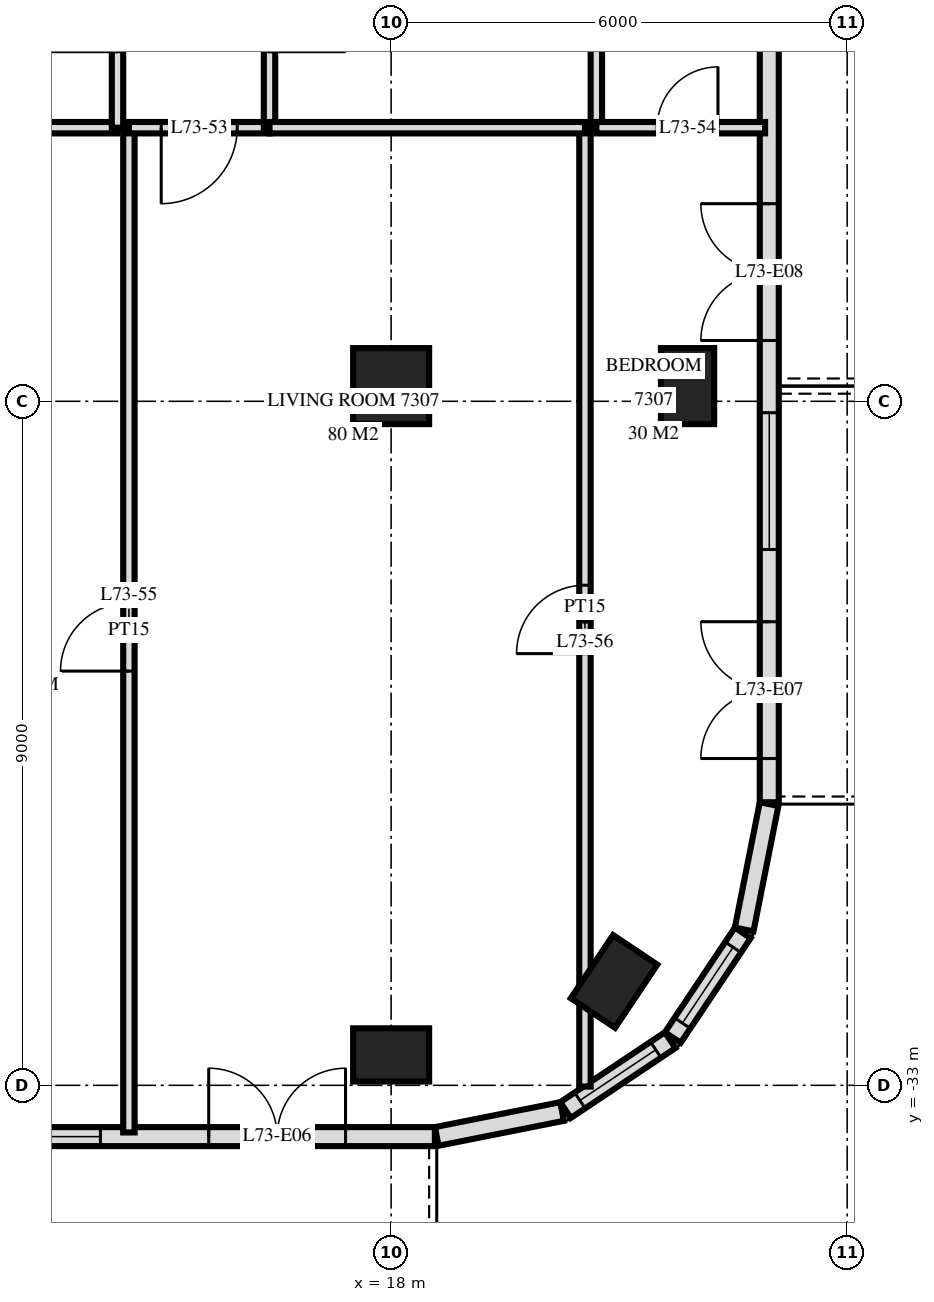
"""IFC4 building model, lengths in metres.
Left out: names, types, materials, properties, quantities, classifications, styles, units other than length and angle.
Written with IfcOpenShell. Run it as: python <this file> out.ifc"""

import sys

from ifc_helpers import new_model, si_unit, direction, frame, frame_2d, origin, origin_2d, place, context, subcontext, project, spatial, rectangle, extrude, element, fill, save


model = new_model("IFC4")
c1 = context("Model", 3, precision=1e-05, world=origin(), true_north=direction((0.0, 1.0)))
c2 = subcontext(c1, "Body", "Model", "MODEL_VIEW")
j1 = project(units=[si_unit("LENGTHUNIT", "METRE"), si_unit("PLANEANGLEUNIT", "RADIAN")], contexts=[c1])
p1 = place(None, origin())
s1 = spatial("IfcSite", under=j1, at=p1, CompositionType="ELEMENT")
p2 = place(p1, origin())
s2 = spatial("IfcBuilding", under=s1, at=p2, CompositionType="ELEMENT")
p3 = place(p2, frame((0.0, 0.0, 277.1)))
s3 = spatial("IfcBuildingStorey", under=s2, at=p3, CompositionType="ELEMENT", Elevation=277.1)
p4 = place(p3, frame((18.0, -32.6, 0.0), z_axis=(0.0, 0.0, 1.0), x_axis=(1.0, 0.0, 0.0)))
e1 = element("IfcColumn", 1, at=p4, inside=s3, PredefinedType="COLUMN", context=c2, shape_type="SweptSolid", body=[
    extrude(rectangle(XDim=1.0, YDim=0.7, at=origin_2d()), origin(), (0.0, 0.0, 1.0), 3.5),
])
p5 = place(p3, frame((18.0, -23.8, 0.0), z_axis=(0.0, 0.0, 1.0), x_axis=(1.0, 0.0, 0.0)))
e2 = element("IfcColumn", 2, at=p5, inside=s3, PredefinedType="COLUMN", context=c2, shape_type="SweptSolid", body=[
    extrude(rectangle(XDim=1.0, YDim=1.0, at=origin_2d()), origin(), (0.0, 0.0, 1.0), 3.5),
])
for number, where, z_axis, x_axis in (
    (3, (20.933, -31.633, 0.0), (0.0, 0.0, 1.0), (0.556, 0.831, 0.0)),
    (4, (21.9, -23.8, 0.0), (0.0, 0.0, 1.0), (0.0, 1.0, 0.0)),
):
    element("IfcColumn", number, at=place(p3, frame(where, z_axis=z_axis, x_axis=x_axis)), inside=s3, PredefinedType="COLUMN", context=c2, shape_type="SweptSolid", body=[
        extrude(rectangle(XDim=1.0, YDim=0.7, at=origin_2d()), origin(), (0.0, 0.0, 1.0), 3.5),
    ])
p6 = place(p3, frame((-18.575, -33.675, 0.0), z_axis=(0.0, 0.0, 1.0), x_axis=(1.0, 0.0, 0.0)))
e5 = element("IfcWall", 5, at=p6, inside=s3, PredefinedType="SOLIDWALL", context=c2, shape_type="SweptSolid", body=[
    extrude(rectangle(XDim=37.151, YDim=0.25, at=frame_2d((18.575, 0.0))), origin(), (0.0, 0.0, 1.0), 3.22),
])
p7 = place(p6, frame((4.175, 0.0, 0.0)))
e6 = element("IfcOpeningElement", 6, at=p7, cuts=e5, PredefinedType="OPENING", context=c2, shape_type="SweptSolid", body=[
    extrude(rectangle(XDim=1.8, YDim=2.4, at=frame_2d((0.9, 1.2))), frame((0.0, 0.135, 0.0), z_axis=(0.0, -1.0, 0.0), x_axis=(1.0, 0.0, 0.0)), (0.0, 0.0, 1.0), 0.27),
])
p8 = place(p6, frame((7.512, 0.0, 0.0)))
e7 = element("IfcOpeningElement", 7, at=p8, cuts=e5, PredefinedType="OPENING", context=c2, shape_type="SweptSolid", body=[
    extrude(rectangle(XDim=1.8, YDim=2.4, at=frame_2d((0.9, 1.2))), frame((0.0, 0.135, 0.0), z_axis=(0.0, -1.0, 0.0), x_axis=(1.0, 0.0, 0.0)), (0.0, 0.0, 1.0), 0.27),
])
p9 = place(p6, frame((10.287, 0.0, 0.9)))
e8 = element("IfcOpeningElement", 8, at=p9, cuts=e5, PredefinedType="OPENING", context=c2, shape_type="SweptSolid", body=[
    extrude(rectangle(XDim=1.8, YDim=1.5, at=frame_2d((0.9, 0.75))), frame((0.0, 0.135, 0.0), z_axis=(0.0, -1.0, 0.0), x_axis=(1.0, 0.0, 0.0)), (0.0, 0.0, 1.0), 0.27),
])
p10 = place(p6, frame((12.875, 0.0, 0.9)))
e9 = element("IfcOpeningElement", 9, at=p10, cuts=e5, PredefinedType="OPENING", context=c2, shape_type="SweptSolid", body=[
    extrude(rectangle(XDim=2.4, YDim=1.5, at=frame_2d((1.2, 0.75))), frame((0.0, 0.135, 0.0), z_axis=(0.0, -1.0, 0.0), x_axis=(1.0, 0.0, 0.0)), (0.0, 0.0, 1.0), 0.27),
])
p11 = place(p6, frame((16.175, 0.0, 0.0)))
e10 = element("IfcOpeningElement", 10, at=p11, cuts=e5, PredefinedType="OPENING", context=c2, shape_type="SweptSolid", body=[
    extrude(rectangle(XDim=1.8, YDim=2.4, at=frame_2d((0.9, 1.2))), frame((0.0, 0.135, 0.0), z_axis=(0.0, -1.0, 0.0), x_axis=(1.0, 0.0, 0.0)), (0.0, 0.0, 1.0), 0.27),
])
p12 = place(p6, frame((19.175, 0.0, 0.0)))
e11 = element("IfcOpeningElement", 11, at=p12, cuts=e5, PredefinedType="OPENING", context=c2, shape_type="SweptSolid", body=[
    extrude(rectangle(XDim=1.8, YDim=2.4, at=frame_2d((0.9, 1.2))), frame((0.0, 0.135, 0.0), z_axis=(0.0, -1.0, 0.0), x_axis=(1.0, 0.0, 0.0)), (0.0, 0.0, 1.0), 0.27),
])
p13 = place(p6, frame((21.875, 0.0, 0.9)))
e12 = element("IfcOpeningElement", 12, at=p13, cuts=e5, PredefinedType="OPENING", context=c2, shape_type="SweptSolid", body=[
    extrude(rectangle(XDim=2.4, YDim=1.5, at=frame_2d((1.2, 0.75))), frame((0.0, 0.135, 0.0), z_axis=(0.0, -1.0, 0.0), x_axis=(1.0, 0.0, 0.0)), (0.0, 0.0, 1.0), 0.27),
])
p14 = place(p6, frame((25.175, 0.0, 0.0)))
e13 = element("IfcOpeningElement", 13, at=p14, cuts=e5, PredefinedType="OPENING", context=c2, shape_type="SweptSolid", body=[
    extrude(rectangle(XDim=1.8, YDim=2.4, at=frame_2d((0.9, 1.2))), frame((0.0, 0.135, 0.0), z_axis=(0.0, -1.0, 0.0), x_axis=(1.0, 0.0, 0.0)), (0.0, 0.0, 1.0), 0.27),
])
p15 = place(p6, frame((27.875, 0.0, 0.9)))
e14 = element("IfcOpeningElement", 14, at=p15, cuts=e5, PredefinedType="OPENING", context=c2, shape_type="SweptSolid", body=[
    extrude(rectangle(XDim=2.4, YDim=1.5, at=frame_2d((1.2, 0.75))), frame((0.0, 0.135, 0.0), z_axis=(0.0, -1.0, 0.0), x_axis=(1.0, 0.0, 0.0)), (0.0, 0.0, 1.0), 0.27),
])
p16 = place(p6, frame((30.95, 0.0, 0.9)))
e15 = element("IfcOpeningElement", 15, at=p16, cuts=e5, PredefinedType="OPENING", context=c2, shape_type="SweptSolid", body=[
    extrude(rectangle(XDim=1.8, YDim=1.5, at=frame_2d((0.9, 0.75))), frame((0.0, 0.135, 0.0), z_axis=(0.0, -1.0, 0.0), x_axis=(1.0, 0.0, 0.0)), (0.0, 0.0, 1.0), 0.27),
])
p17 = place(p6, frame((34.175, 0.0, 0.0)))
e16 = element("IfcOpeningElement", 16, at=p17, cuts=e5, PredefinedType="OPENING", context=c2, shape_type="SweptSolid", body=[
    extrude(rectangle(XDim=1.8, YDim=2.4, at=frame_2d((0.9, 1.2))), frame((0.0, 0.135, 0.0), z_axis=(0.0, -1.0, 0.0), x_axis=(1.0, 0.0, 0.0)), (0.0, 0.0, 1.0), 0.27),
])
p18 = place(p3, frame((18.6, -33.673, 0.0), z_axis=(0.0, 0.0, 1.0), x_axis=(0.980770110232, 0.195166572128, 0.0)))
e17 = element("IfcWall", 17, at=p18, inside=s3, PredefinedType="SOLIDWALL", context=c2, shape_type="SweptSolid", body=[
    extrude(rectangle(XDim=1.681, YDim=0.25, at=frame_2d((0.841, 0.0))), origin(), (0.0, 0.0, 1.0), 3.22),
])
p19 = place(p3, frame((20.294, -33.326, 0.0), z_axis=(0.0, 0.0, 1.0), x_axis=(0.831482937015, 0.55555029066, 0.0)))
e18 = element("IfcWall", 18, at=p19, inside=s3, PredefinedType="SOLIDWALL", context=c2, shape_type="SweptSolid", body=[
    extrude(rectangle(XDim=1.656, YDim=0.25, at=frame_2d((0.828, 0.0))), origin(), (0.0, 0.0, 1.0), 3.22),
])
p20 = place(p19, frame((0.228, 0.0, 0.9)))
e19 = element("IfcOpeningElement", 19, at=p20, cuts=e18, PredefinedType="OPENING", context=c2, shape_type="SweptSolid", body=[
    extrude(rectangle(XDim=1.2, YDim=1.5, at=frame_2d((0.6, 0.75))), frame((0.0, 0.135, 0.0), z_axis=(0.0, -1.0, 0.0), x_axis=(1.0, 0.0, 0.0)), (0.0, 0.0, 1.0), 0.27),
])
p21 = place(p3, frame((21.706, -32.371, 0.0), z_axis=(0.0, 0.0, 1.0), x_axis=(0.55555029066, 0.831482937015, 0.0)))
e20 = element("IfcWall", 20, at=p21, inside=s3, PredefinedType="SOLIDWALL", context=c2, shape_type="SweptSolid", body=[
    extrude(rectangle(XDim=1.656, YDim=0.25, at=frame_2d((0.828, 0.0))), origin(), (0.0, 0.0, 1.0), 3.22),
])
p22 = place(p21, frame((0.228, 0.0, 0.9)))
e21 = element("IfcOpeningElement", 21, at=p22, cuts=e20, PredefinedType="OPENING", context=c2, shape_type="SweptSolid", body=[
    extrude(rectangle(XDim=1.2, YDim=1.5, at=frame_2d((0.6, 0.75))), frame((0.0, 0.135, 0.0), z_axis=(0.0, -1.0, 0.0), x_axis=(1.0, 0.0, 0.0)), (0.0, 0.0, 1.0), 0.27),
])
p23 = place(p3, frame((22.645, -30.949, 0.0), z_axis=(0.0, 0.0, 1.0), x_axis=(0.19513878023, 0.980775640221, 0.0)))
e22 = element("IfcWall", 22, at=p23, inside=s3, PredefinedType="SOLIDWALL", context=c2, shape_type="SweptSolid", body=[
    extrude(rectangle(XDim=1.681, YDim=0.25, at=frame_2d((0.841, 0.0))), origin(), (0.0, 0.0, 1.0), 3.22),
])
p24 = place(p3, frame((22.975, -29.275, 0.0), z_axis=(0.0, 0.0, 1.0), x_axis=(0.0, 1.0, 0.0)))
e23 = element("IfcWall", 23, at=p24, inside=s3, PredefinedType="SOLIDWALL", context=c2, shape_type="SweptSolid", body=[
    extrude(rectangle(XDim=25.951, YDim=0.25, at=frame_2d((12.975, 0.0))), origin(), (0.0, 0.0, 1.0), 3.22),
])
p25 = place(p24, frame((0.575, 0.0, 0.0)))
e24 = element("IfcOpeningElement", 24, at=p25, cuts=e23, PredefinedType="OPENING", context=c2, shape_type="SweptSolid", body=[
    extrude(rectangle(XDim=1.8, YDim=2.4, at=frame_2d((0.9, 1.2))), frame((0.0, 0.135, 0.0), z_axis=(0.0, -1.0, 0.0), x_axis=(1.0, 0.0, 0.0)), (0.0, 0.0, 1.0), 0.27),
])
p26 = place(p24, frame((3.325, 0.0, 0.9)))
e25 = element("IfcOpeningElement", 25, at=p26, cuts=e23, PredefinedType="OPENING", context=c2, shape_type="SweptSolid", body=[
    extrude(rectangle(XDim=1.8, YDim=1.5, at=frame_2d((0.9, 0.75))), frame((0.0, 0.135, 0.0), z_axis=(0.0, -1.0, 0.0), x_axis=(1.0, 0.0, 0.0)), (0.0, 0.0, 1.0), 0.27),
])
p27 = place(p24, frame((6.075, 0.0, 0.0)))
e26 = element("IfcOpeningElement", 26, at=p27, cuts=e23, PredefinedType="OPENING", context=c2, shape_type="SweptSolid", body=[
    extrude(rectangle(XDim=1.8, YDim=2.4, at=frame_2d((0.9, 1.2))), frame((0.0, 0.135, 0.0), z_axis=(0.0, -1.0, 0.0), x_axis=(1.0, 0.0, 0.0)), (0.0, 0.0, 1.0), 0.27),
])
p28 = place(p24, frame((12.475, 0.0, 0.9)))
e27 = element("IfcOpeningElement", 27, at=p28, cuts=e23, PredefinedType="OPENING", context=c2, shape_type="SweptSolid", body=[
    extrude(rectangle(XDim=1.2, YDim=1.5, at=frame_2d((0.6, 0.75))), frame((0.0, 0.135, 0.0), z_axis=(0.0, -1.0, 0.0), x_axis=(1.0, 0.0, 0.0)), (0.0, 0.0, 1.0), 0.27),
])
p29 = place(p24, frame((16.175, 0.0, 0.0)))
e28 = element("IfcOpeningElement", 28, at=p29, cuts=e23, PredefinedType="OPENING", context=c2, shape_type="SweptSolid", body=[
    extrude(rectangle(XDim=1.8, YDim=2.4, at=frame_2d((0.9, 1.2))), frame((0.0, 0.135, 0.0), z_axis=(0.0, -1.0, 0.0), x_axis=(1.0, 0.0, 0.0)), (0.0, 0.0, 1.0), 0.27),
])
p30 = place(p24, frame((20.925, 0.0, 0.0)))
e29 = element("IfcOpeningElement", 29, at=p30, cuts=e23, PredefinedType="OPENING", context=c2, shape_type="SweptSolid", body=[
    extrude(rectangle(XDim=1.8, YDim=2.4, at=frame_2d((0.9, 1.2))), frame((0.0, 0.135, 0.0), z_axis=(0.0, -1.0, 0.0), x_axis=(1.0, 0.0, 0.0)), (0.0, 0.0, 1.0), 0.27),
])
p31 = place(p3, frame((20.7, -20.4, 0.0), z_axis=(0.0, 0.0, 1.0), x_axis=(0.0, 1.0, 0.0)))
e30 = element("IfcWall", 30, at=p31, inside=s3, PredefinedType="PARTITIONING", context=c2, shape_type="SweptSolid", body=[
    extrude(rectangle(XDim=3.0, YDim=0.15, at=frame_2d((1.5, 0.0))), origin(), (0.0, 0.0, 1.0), 3.22),
])
p32 = place(p3, frame((20.55, -33.017, 0.0), z_axis=(0.0, 0.0, 1.0), x_axis=(0.0, 1.0, 0.0)))
e31 = element("IfcWall", 31, at=p32, inside=s3, PredefinedType="PARTITIONING", context=c2, shape_type="SweptSolid", body=[
    extrude(rectangle(XDim=12.617, YDim=0.15, at=frame_2d((6.308, 0.0))), origin(), (0.0, 0.0, 1.0), 3.22),
])
p33 = place(p32, frame((5.697, 0.0, 0.0)))
e32 = element("IfcOpeningElement", 32, at=p33, cuts=e31, PredefinedType="OPENING", context=c2, shape_type="SweptSolid", body=[
    extrude(rectangle(XDim=0.9, YDim=2.1, at=frame_2d((0.45, 1.05))), frame((0.0, 0.085, 0.0), z_axis=(0.0, -1.0, 0.0), x_axis=(1.0, 0.0, 0.0)), (0.0, 0.0, 1.0), 0.17),
])
p34 = place(p3, frame((16.4, -20.4, 0.0), z_axis=(0.0, 0.0, 1.0), x_axis=(0.0, 1.0, 0.0)))
e33 = element("IfcWall", 33, at=p34, inside=s3, PredefinedType="PARTITIONING", context=c2, shape_type="SweptSolid", body=[
    extrude(rectangle(XDim=3.0, YDim=0.15, at=frame_2d((1.5, 0.0))), origin(), (0.0, 0.0, 1.0), 3.22),
])
p35 = place(p34, frame((1.0, 0.0, 0.0)))
e34 = element("IfcOpeningElement", 34, at=p35, cuts=e33, PredefinedType="OPENING", context=c2, shape_type="SweptSolid", body=[
    extrude(rectangle(XDim=1.0, YDim=2.1, at=frame_2d((0.5, 1.05))), frame((0.0, 0.085, 0.0), z_axis=(0.0, -1.0, 0.0), x_axis=(1.0, 0.0, 0.0)), (0.0, 0.0, 1.0), 0.17),
])
p36 = place(p3, frame((14.55, -33.62, 0.0), z_axis=(0.0, 0.0, 1.0), x_axis=(0.0, 1.0, 0.0)))
e35 = element("IfcWall", 35, at=p36, inside=s3, PredefinedType="PARTITIONING", context=c2, shape_type="SweptSolid", body=[
    extrude(rectangle(XDim=13.22, YDim=0.15, at=frame_2d((6.61, 0.0))), origin(), (0.0, 0.0, 1.0), 3.22),
])
p37 = place(p36, frame((6.07, 0.0, 0.0)))
e36 = element("IfcOpeningElement", 36, at=p37, cuts=e35, PredefinedType="OPENING", context=c2, shape_type="SweptSolid", body=[
    extrude(rectangle(XDim=0.9, YDim=2.1, at=frame_2d((0.45, 1.05))), frame((0.0, 0.085, 0.0), z_axis=(0.0, -1.0, 0.0), x_axis=(1.0, 0.0, 0.0)), (0.0, 0.0, 1.0), 0.17),
])
p38 = place(p3, frame((14.4, -20.4, 0.0), z_axis=(0.0, 0.0, 1.0), x_axis=(0.0, 1.0, 0.0)))
e37 = element("IfcWall", 37, at=p38, inside=s3, PredefinedType="PARTITIONING", context=c2, shape_type="SweptSolid", body=[
    extrude(rectangle(XDim=3.0, YDim=0.15, at=frame_2d((1.5, 0.0))), origin(), (0.0, 0.0, 1.0), 3.22),
])
p39 = place(p38, frame((1.0, 0.0, 0.0)))
e38 = element("IfcOpeningElement", 38, at=p39, cuts=e37, PredefinedType="OPENING", context=c2, shape_type="SweptSolid", body=[
    extrude(rectangle(XDim=1.0, YDim=2.1, at=frame_2d((0.5, 1.05))), frame((0.0, 0.085, 0.0), z_axis=(0.0, -1.0, 0.0), x_axis=(1.0, 0.0, 0.0)), (0.0, 0.0, 1.0), 0.17),
])
p40 = place(p3, frame((14.55, -20.4, 0.0), z_axis=(0.0, 0.0, 1.0), x_axis=(1.0, 0.0, 0.0)))
e39 = element("IfcWall", 39, at=p40, inside=s3, PredefinedType="PARTITIONING", context=c2, shape_type="SweptSolid", body=[
    extrude(rectangle(XDim=1.85, YDim=0.15, at=frame_2d((0.925, 0.0))), origin(), (0.0, 0.0, 1.0), 3.22),
])
p41 = place(p40, frame((0.425, 0.0, 0.0)))
e40 = element("IfcOpeningElement", 40, at=p41, cuts=e39, PredefinedType="OPENING", context=c2, shape_type="SweptSolid", body=[
    extrude(rectangle(XDim=1.0, YDim=2.1, at=frame_2d((0.5, 1.05))), frame((0.0, 0.085, 0.0), z_axis=(0.0, -1.0, 0.0), x_axis=(1.0, 0.0, 0.0)), (0.0, 0.0, 1.0), 0.17),
])
p42 = place(p3, frame((12.0, -20.4, 0.0), z_axis=(0.0, 0.0, 1.0), x_axis=(1.0, 0.0, 0.0)))
e41 = element("IfcWall", 41, at=p42, inside=s3, PredefinedType="PARTITIONING", context=c2, shape_type="SweptSolid", body=[
    extrude(rectangle(XDim=2.4, YDim=0.15, at=frame_2d((1.2, 0.0))), origin(), (0.0, 0.0, 1.0), 3.22),
])
p43 = place(p3, frame((16.4, -20.4, 0.0), z_axis=(0.0, 0.0, 1.0), x_axis=(1.0, 0.0, 0.0)))
e42 = element("IfcWall", 42, at=p43, inside=s3, PredefinedType="PARTITIONING", context=c2, shape_type="SweptSolid", body=[
    extrude(rectangle(XDim=4.15, YDim=0.15, at=frame_2d((2.075, 0.0))), origin(), (0.0, 0.0, 1.0), 3.22),
])
p44 = place(p3, frame((20.7, -20.4, 0.0), z_axis=(0.0, 0.0, 1.0), x_axis=(1.0, 0.0, 0.0)))
e43 = element("IfcWall", 43, at=p44, inside=s3, PredefinedType="PARTITIONING", context=c2, shape_type="SweptSolid", body=[
    extrude(rectangle(XDim=2.22, YDim=0.15, at=frame_2d((1.11, 0.0))), origin(), (0.0, 0.0, 1.0), 3.22),
])
p45 = place(p44, frame((0.8, 0.0, 0.0)))
e44 = element("IfcOpeningElement", 44, at=p45, cuts=e43, PredefinedType="OPENING", context=c2, shape_type="SweptSolid", body=[
    extrude(rectangle(XDim=0.8, YDim=2.1, at=frame_2d((0.4, 1.05))), frame((0.0, 0.085, 0.0), z_axis=(0.0, -1.0, 0.0), x_axis=(1.0, 0.0, 0.0)), (0.0, 0.0, 1.0), 0.17),
])
p46 = place(p20, origin())
e45 = element("IfcWindow", 45, at=p46, inside=s3, PartitioningType="SINGLE_PANEL", PredefinedType="WINDOW", context=c2, shape_type="SweptSolid", body=[
    extrude(rectangle(XDim=1.2, YDim=1.5, at=frame_2d((0.6, 0.75))), frame((0.0, 0.03, 0.0), z_axis=(0.0, -1.0, 0.0), x_axis=(1.0, 0.0, 0.0)), (0.0, 0.0, 1.0), 0.06),
])
fill(e19, e45)
p47 = place(p22, origin())
e46 = element("IfcWindow", 46, at=p47, inside=s3, PartitioningType="SINGLE_PANEL", PredefinedType="WINDOW", context=c2, shape_type="SweptSolid", body=[
    extrude(rectangle(XDim=1.2, YDim=1.5, at=frame_2d((0.6, 0.75))), frame((0.0, 0.03, 0.0), z_axis=(0.0, -1.0, 0.0), x_axis=(1.0, 0.0, 0.0)), (0.0, 0.0, 1.0), 0.06),
])
fill(e21, e46)
p48 = place(p16, origin())
e47 = element("IfcWindow", 47, at=p48, inside=s3, PartitioningType="SINGLE_PANEL", PredefinedType="WINDOW", context=c2, shape_type="SweptSolid", body=[
    extrude(rectangle(XDim=1.8, YDim=1.5, at=frame_2d((0.9, 0.75))), frame((0.0, 0.03, 0.0), z_axis=(0.0, -1.0, 0.0), x_axis=(1.0, 0.0, 0.0)), (0.0, 0.0, 1.0), 0.06),
])
fill(e15, e47)
p49 = place(p17, origin())
e48 = element("IfcDoor", 48, at=p49, inside=s3, OperationType="DOUBLE_DOOR_SINGLE_SWING", PredefinedType="DOOR", context=c2, shape_type="SweptSolid", body=[
    extrude(rectangle(XDim=1.8, YDim=2.4, at=frame_2d((0.9, 1.2))), frame((0.0, 0.025, 0.0), z_axis=(0.0, -1.0, 0.0), x_axis=(1.0, 0.0, 0.0)), (0.0, 0.0, 1.0), 0.05),
])
fill(e16, e48)
p50 = place(p25, origin())
e49 = element("IfcDoor", 49, at=p50, inside=s3, OperationType="DOUBLE_DOOR_SINGLE_SWING", PredefinedType="DOOR", context=c2, shape_type="SweptSolid", body=[
    extrude(rectangle(XDim=1.8, YDim=2.4, at=frame_2d((0.9, 1.2))), frame((0.0, 0.025, 0.0), z_axis=(0.0, -1.0, 0.0), x_axis=(1.0, 0.0, 0.0)), (0.0, 0.0, 1.0), 0.05),
])
fill(e24, e49)
p51 = place(p26, origin())
e50 = element("IfcWindow", 50, at=p51, inside=s3, PartitioningType="SINGLE_PANEL", PredefinedType="WINDOW", context=c2, shape_type="SweptSolid", body=[
    extrude(rectangle(XDim=1.8, YDim=1.5, at=frame_2d((0.9, 0.75))), frame((0.0, 0.03, 0.0), z_axis=(0.0, -1.0, 0.0), x_axis=(1.0, 0.0, 0.0)), (0.0, 0.0, 1.0), 0.06),
])
fill(e25, e50)
p52 = place(p27, origin())
e51 = element("IfcDoor", 51, at=p52, inside=s3, OperationType="DOUBLE_DOOR_SINGLE_SWING", PredefinedType="DOOR", context=c2, shape_type="SweptSolid", body=[
    extrude(rectangle(XDim=1.8, YDim=2.4, at=frame_2d((0.9, 1.2))), frame((0.0, 0.025, 0.0), z_axis=(0.0, -1.0, 0.0), x_axis=(1.0, 0.0, 0.0)), (0.0, 0.0, 1.0), 0.05),
])
fill(e26, e51)
p53 = place(p41, frame((0.5, 0.0, 0.0), z_axis=(0.0, 0.0, 1.0), x_axis=(-1.0, 0.0, 0.0)))
e52 = element("IfcDoor", 52, at=p53, inside=s3, OperationType="SINGLE_SWING_LEFT", PredefinedType="DOOR", context=c2, shape_type="SweptSolid", body=[
    extrude(rectangle(XDim=1.0, YDim=2.1, at=frame_2d((0.0, 1.05))), frame((0.0, -0.025, 0.0), z_axis=(0.0, 1.0, 0.0), x_axis=(-1.0, 0.0, 0.0)), (0.0, 0.0, 1.0), 0.05),
])
fill(e40, e52)
p54 = place(p45, origin())
e53 = element("IfcDoor", 53, at=p54, inside=s3, OperationType="SINGLE_SWING_LEFT", PredefinedType="DOOR", context=c2, shape_type="SweptSolid", body=[
    extrude(rectangle(XDim=0.8, YDim=2.1, at=frame_2d((0.4, 1.05))), frame((0.0, 0.025, 0.0), z_axis=(0.0, -1.0, 0.0), x_axis=(1.0, 0.0, 0.0)), (0.0, 0.0, 1.0), 0.05),
])
fill(e44, e53)
p55 = place(p37, origin())
e54 = element("IfcDoor", 54, at=p55, inside=s3, OperationType="SINGLE_SWING_RIGHT", PredefinedType="DOOR", context=c2, shape_type="SweptSolid", body=[
    extrude(rectangle(XDim=0.9, YDim=2.1, at=frame_2d((0.45, 1.05))), frame((0.0, 0.025, 0.0), z_axis=(0.0, -1.0, 0.0), x_axis=(1.0, 0.0, 0.0)), (0.0, 0.0, 1.0), 0.05),
])
fill(e36, e54)
p56 = place(p33, origin())
e55 = element("IfcDoor", 55, at=p56, inside=s3, OperationType="SINGLE_SWING_RIGHT", PredefinedType="DOOR", context=c2, shape_type="SweptSolid", body=[
    extrude(rectangle(XDim=0.9, YDim=2.1, at=frame_2d((0.45, 1.05))), frame((0.0, 0.025, 0.0), z_axis=(0.0, -1.0, 0.0), x_axis=(1.0, 0.0, 0.0)), (0.0, 0.0, 1.0), 0.05),
])
fill(e32, e55)
save(model, sys.argv[1])
